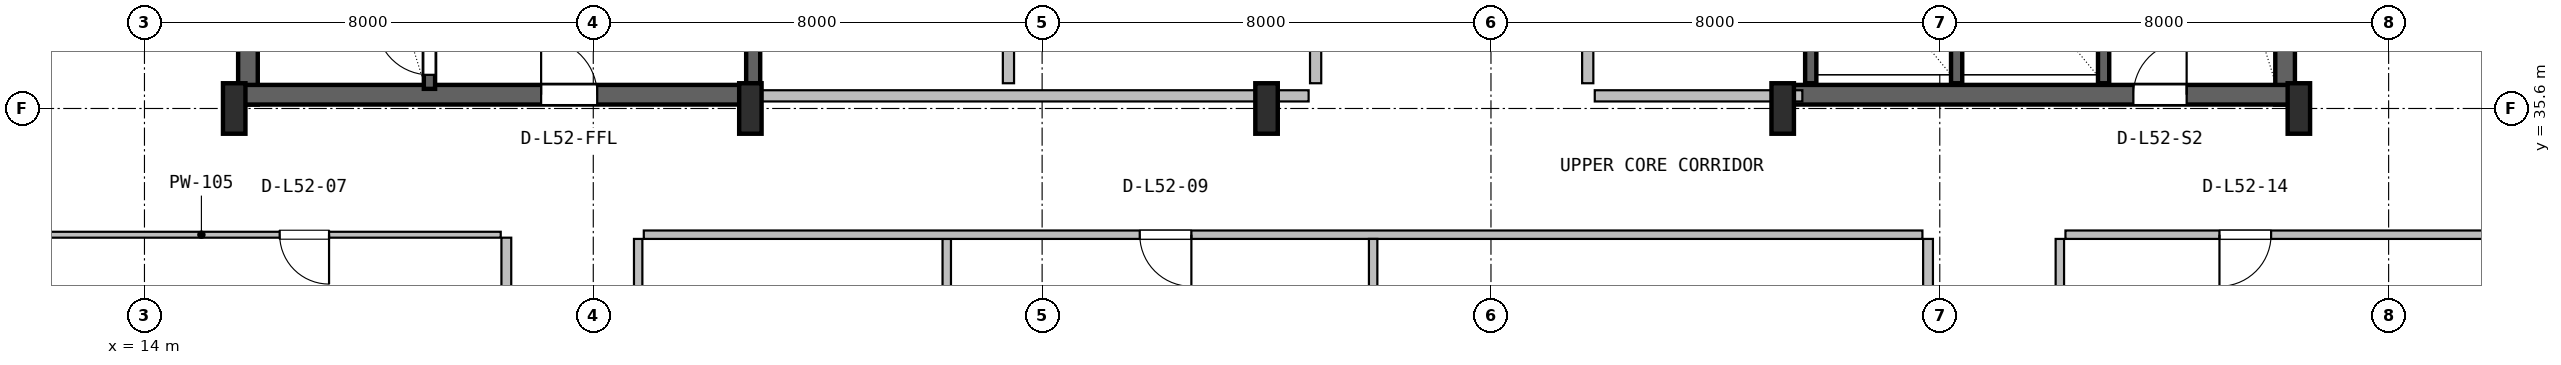
"""IFC4 building model, lengths in metres.
Left out: names, types, materials, properties, quantities, classifications, styles, units other than length and angle.
Written with IfcOpenShell. Run it as: python <this file> out.ifc"""

import sys

from ifc_helpers import new_model, si_unit, direction, frame, frame_2d, origin, origin_2d, place, context, subcontext, project, spatial, rectangle, i_section, extrude, source, transform, mapped, element, fill, save


model = new_model("IFC4")
c1 = context("Model", 3, precision=1e-05, world=origin(), true_north=direction((0.0, 1.0)))
c2 = subcontext(c1, "Body", "Model", "MODEL_VIEW")
j1 = project(units=[si_unit("LENGTHUNIT", "METRE"), si_unit("PLANEANGLEUNIT", "RADIAN")], contexts=[c1])
p1 = place(None, origin())
s1 = spatial("IfcSite", under=j1, at=p1, CompositionType="ELEMENT")
p2 = place(p1, origin())
s2 = spatial("IfcBuilding", under=s1, at=p2, CompositionType="ELEMENT")
p3 = place(p2, frame((0.0, 0.0, 211.2)))
s3 = spatial("IfcBuildingStorey", under=s2, at=p3, CompositionType="ELEMENT", Elevation=211.2)
for number, where, z_axis, x_axis in (
    (1, (15.845, 35.67, 0.0), (0.0, 0.0, 1.0), (0.0, 1.0, 0.0)),
    (2, (52.155, 35.67, 0.0), (0.0, 0.0, 1.0), (0.0, 1.0, 0.0)),
):
    element("IfcWall", number, at=place(p3, frame(where, z_axis=z_axis, x_axis=x_axis)), inside=s3, PredefinedType="SHEAR", context=c2, shape_type="SweptSolid", body=[
        extrude(rectangle(XDim=11.13, YDim=0.35, at=frame_2d((5.565, 0.0))), origin(), (0.0, 0.0, 1.0), 3.55),
    ])
p4 = place(p3, frame((15.67, 35.845, 0.0), z_axis=(0.0, 0.0, 1.0), x_axis=(1.0, 0.0, 0.0)))
e3 = element("IfcWall", 3, at=p4, inside=s3, PredefinedType="SHEAR", context=c2, shape_type="SweptSolid", body=[
    extrude(rectangle(XDim=9.13, YDim=0.35, at=frame_2d((4.565, 0.0))), origin(), (0.0, 0.0, 1.0), 3.55),
])
p5 = place(p4, frame((5.4, 0.0, 0.0)))
e4 = element("IfcOpeningElement", 4, at=p5, cuts=e3, PredefinedType="OPENING", context=c2, shape_type="SweptSolid", body=[
    extrude(rectangle(XDim=1.0, YDim=2.1, at=frame_2d((0.5, 1.05))), frame((0.0, 0.185, 0.0), z_axis=(0.0, -1.0, 0.0), x_axis=(1.0, 0.0, 0.0)), (0.0, 0.0, 1.0), 0.37),
])
p6 = place(p3, frame((43.2, 35.845, 0.0), z_axis=(0.0, 0.0, 1.0), x_axis=(1.0, 0.0, 0.0)))
e5 = element("IfcWall", 5, at=p6, inside=s3, PredefinedType="SHEAR", context=c2, shape_type="SweptSolid", body=[
    extrude(rectangle(XDim=9.13, YDim=0.35, at=frame_2d((4.565, 0.0))), origin(), (0.0, 0.0, 1.0), 3.55),
])
p7 = place(p6, frame((6.25, 0.0, 0.0)))
e6 = element("IfcOpeningElement", 6, at=p7, cuts=e5, PredefinedType="OPENING", context=c2, shape_type="SweptSolid", body=[
    extrude(rectangle(XDim=0.95, YDim=2.1, at=frame_2d((0.475, 1.05))), frame((0.0, 0.185, 0.0), z_axis=(0.0, -1.0, 0.0), x_axis=(1.0, 0.0, 0.0)), (0.0, 0.0, 1.0), 0.37),
])
m1 = source(origin(), c2, "Body", "SweptSolid", [
    extrude(i_section(OverallWidth=0.4, OverallDepth=0.9, WebThickness=0.016, FlangeThickness=0.028, FilletRadius=0.016, at=origin_2d()), origin(), (0.0, 0.0, 1.0), 3.8),
])
for number, where, z_axis, x_axis in (
    (7, (15.6, 35.6, 0.0), (0.0, 0.0, 1.0), (1.0, 0.0, 0.0)),
    (8, (24.8, 35.6, 0.0), (0.0, 0.0, 1.0), (1.0, 0.0, 0.0)),
    (9, (34.0, 35.6, 0.0), (0.0, 0.0, 1.0), (1.0, 0.0, 0.0)),
    (10, (43.2, 35.6, 0.0), (0.0, 0.0, 1.0), (1.0, 0.0, 0.0)),
    (11, (52.4, 35.6, 0.0), (0.0, 0.0, 1.0), (1.0, 0.0, 0.0)),
):
    element("IfcColumn", number, at=place(p3, frame(where, z_axis=z_axis, x_axis=x_axis)), inside=s3, PredefinedType="COLUMN", context=c2, shape_type="MappedRepresentation", body=[
        mapped(m1, transform((0.0, 0.0, 0.0), x_axis=(1.0, 0.0, 0.0), y_axis=(0.0, 1.0, 0.0), z_axis=(0.0, 0.0, 1.0), scale=1.0)),
    ])
p8 = place(p3, frame((19.08, 35.95, 0.0), z_axis=(0.0, 0.0, 1.0), x_axis=(0.0, 1.0, 0.0)))
e12 = element("IfcWall", 12, at=p8, inside=s3, PredefinedType="SHEAR", context=c2, shape_type="SweptSolid", body=[
    extrude(rectangle(XDim=9.65, YDim=0.2, at=frame_2d((4.825, 0.0))), origin(), (0.0, 0.0, 1.0), 3.55),
])
p9 = place(p8, frame((0.25, 0.0, 0.0)))
e13 = element("IfcOpeningElement", 13, at=p9, cuts=e12, PredefinedType="OPENING", context=c2, shape_type="SweptSolid", body=[
    extrude(rectangle(XDim=0.95, YDim=2.1, at=frame_2d((0.475, 1.05))), frame((0.0, 0.11, 0.0), z_axis=(0.0, -1.0, 0.0), x_axis=(1.0, 0.0, 0.0)), (0.0, 0.0, 1.0), 0.22),
])
p10 = place(p3, frame((24.85, 36.05, 0.0), z_axis=(0.0, 0.0, 1.0), x_axis=(0.0, 1.0, 0.0)))
e14 = element("IfcWall", 14, at=p10, inside=s3, PredefinedType="SHEAR", context=c2, shape_type="SweptSolid", body=[
    extrude(rectangle(XDim=10.45, YDim=0.25, at=frame_2d((5.225, 0.0))), origin(), (0.0, 0.0, 1.0), 3.55),
])
p11 = place(p3, frame((48.92, 36.05, 0.0), z_axis=(0.0, 0.0, 1.0), x_axis=(0.0, 1.0, 0.0)))
e15 = element("IfcWall", 15, at=p11, inside=s3, PredefinedType="SHEAR", context=c2, shape_type="SweptSolid", body=[
    extrude(rectangle(XDim=10.5, YDim=0.2, at=frame_2d((5.25, 0.0))), origin(), (0.0, 0.0, 1.0), 3.55),
])
for number, where, z_axis, x_axis in (
    (16, (43.7, 36.05, 0.0), (0.0, 0.0, 1.0), (0.0, 1.0, 0.0)),
    (17, (46.3, 36.05, 0.0), (0.0, 0.0, 1.0), (0.0, 1.0, 0.0)),
):
    element("IfcWall", number, at=place(p3, frame(where, z_axis=z_axis, x_axis=x_axis)), inside=s3, PredefinedType="SHEAR", context=c2, shape_type="SweptSolid", body=[
        extrude(rectangle(XDim=3.05, YDim=0.2, at=frame_2d((1.525, 0.0))), origin(), (0.0, 0.0, 1.0), 3.55),
    ])
p12 = place(p3, frame((25.0, 35.825, 0.0), z_axis=(0.0, 0.0, 1.0), x_axis=(1.0, 0.0, 0.0)))
e18 = element("IfcWall", 18, at=p12, inside=s3, PredefinedType="PLUMBINGWALL", context=c2, shape_type="SweptSolid", body=[
    extrude(rectangle(XDim=9.75, YDim=0.2, at=frame_2d((4.875, 0.0))), origin(), (0.0, 0.0, 1.0), 2.575),
])
for number, where, z_axis, x_axis in (
    (19, (29.4, 36.05, 0.0), (0.0, 0.0, 1.0), (0.0, 1.0, 0.0)),
    (20, (34.875, 36.05, 0.0), (0.0, 0.0, 1.0), (0.0, 1.0, 0.0)),
):
    element("IfcWall", number, at=place(p3, frame(where, z_axis=z_axis, x_axis=x_axis)), inside=s3, PredefinedType="PLUMBINGWALL", context=c2, shape_type="SweptSolid", body=[
        extrude(rectangle(XDim=3.1, YDim=0.2, at=frame_2d((1.55, 0.0))), origin(), (0.0, 0.0, 1.0), 3.53),
    ])
p13 = place(p3, frame((39.85, 35.825, 0.0), z_axis=(0.0, 0.0, 1.0), x_axis=(1.0, 0.0, 0.0)))
e21 = element("IfcWall", 21, at=p13, inside=s3, PredefinedType="SOLIDWALL", context=c2, shape_type="SweptSolid", body=[
    extrude(rectangle(XDim=3.7, YDim=0.2, at=frame_2d((1.85, 0.0))), origin(), (0.0, 0.0, 1.0), 2.575),
])
p14 = place(p3, frame((39.725, 36.05, 0.0), z_axis=(0.0, 0.0, 1.0), x_axis=(0.0, 1.0, 0.0)))
e22 = element("IfcWall", 22, at=p14, inside=s3, PredefinedType="SOLIDWALL", context=c2, shape_type="SweptSolid", body=[
    extrude(rectangle(XDim=3.1, YDim=0.2, at=frame_2d((1.55, 0.0))), origin(), (0.0, 0.0, 1.0), 3.53),
])
p15 = place(p3, frame((20.45, 10.38, 0.0), z_axis=(0.0, 0.0, 1.0), x_axis=(0.0, 1.0, 0.0)))
e23 = element("IfcWall", 23, at=p15, inside=s3, PredefinedType="PARTITIONING", context=c2, shape_type="SweptSolid", body=[
    extrude(rectangle(XDim=22.917, YDim=0.175, at=frame_2d((11.458, 0.0))), origin(), (0.0, 0.0, 1.0), 3.171),
])
p16 = place(p15, frame((2.935, 0.0, 0.0)))
e24 = element("IfcOpeningElement", 24, at=p16, cuts=e23, PredefinedType="OPENING", context=c2, shape_type="SweptSolid", body=[
    extrude(rectangle(XDim=1.05, YDim=2.1, at=frame_2d((0.525, 1.05))), frame((0.0, 0.098, 0.0), z_axis=(0.0, -1.0, 0.0), x_axis=(1.0, 0.0, 0.0)), (0.0, 0.0, 1.0), 0.195),
])
p17 = place(p15, frame((9.29, 0.0, 0.0)))
e25 = element("IfcOpeningElement", 25, at=p17, cuts=e23, PredefinedType="OPENING", context=c2, shape_type="SweptSolid", body=[
    extrude(rectangle(XDim=0.88, YDim=2.06, at=frame_2d((0.44, 1.03))), frame((0.0, 0.098, 0.0), z_axis=(0.0, -1.0, 0.0), x_axis=(1.0, 0.0, 0.0)), (0.0, 0.0, 1.0), 0.195),
])
p18 = place(p15, frame((14.815, 0.0, 0.0)))
e26 = element("IfcOpeningElement", 26, at=p18, cuts=e23, PredefinedType="OPENING", context=c2, shape_type="SweptSolid", body=[
    extrude(rectangle(XDim=1.0, YDim=2.1, at=frame_2d((0.5, 1.05))), frame((0.0, 0.098, 0.0), z_axis=(0.0, -1.0, 0.0), x_axis=(1.0, 0.0, 0.0)), (0.0, 0.0, 1.0), 0.195),
])
p19 = place(p3, frame((9.68, 33.35, 0.0), z_axis=(0.0, 0.0, 1.0), x_axis=(1.0, 0.0, 0.0)))
e27 = element("IfcWall", 27, at=p19, inside=s3, PredefinedType="PARTITIONING", context=c2, shape_type="SweptSolid", body=[
    extrude(rectangle(XDim=10.67, YDim=0.105, at=frame_2d((5.335, 0.0))), origin(), (0.0, 0.0, 1.0), 3.171),
])
p20 = place(p19, frame((6.73, 0.0, 0.0)))
e28 = element("IfcOpeningElement", 28, at=p20, cuts=e27, PredefinedType="OPENING", context=c2, shape_type="SweptSolid", body=[
    extrude(rectangle(XDim=0.88, YDim=2.06, at=frame_2d((0.44, 1.03))), frame((0.0, 0.062, 0.0), z_axis=(0.0, -1.0, 0.0), x_axis=(1.0, 0.0, 0.0)), (0.0, 0.0, 1.0), 0.125),
])
p21 = place(p3, frame((28.3, 10.38, 0.0), z_axis=(0.0, 0.0, 1.0), x_axis=(0.0, 1.0, 0.0)))
e29 = element("IfcWall", 29, at=p21, inside=s3, PredefinedType="PARTITIONING", context=c2, shape_type="SweptSolid", body=[
    extrude(rectangle(XDim=22.895, YDim=0.15, at=frame_2d((11.448, 0.0))), origin(), (0.0, 0.0, 1.0), 2.908),
])
p22 = place(p3, frame((22.9, 33.35, 0.0), z_axis=(0.0, 0.0, 1.0), x_axis=(1.0, 0.0, 0.0)))
e30 = element("IfcWall", 30, at=p22, inside=s3, PredefinedType="PARTITIONING", context=c2, shape_type="SweptSolid", body=[
    extrude(rectangle(XDim=22.79, YDim=0.15, at=frame_2d((11.395, 0.0))), origin(), (0.0, 0.0, 1.0), 2.908),
])
p23 = place(p22, frame((8.84, 0.0, 0.0)))
e31 = element("IfcOpeningElement", 31, at=p23, cuts=e30, PredefinedType="OPENING", context=c2, shape_type="SweptSolid", body=[
    extrude(rectangle(XDim=0.92, YDim=2.08, at=frame_2d((0.46, 1.04))), frame((0.0, 0.085, 0.0), z_axis=(0.0, -1.0, 0.0), x_axis=(1.0, 0.0, 0.0)), (0.0, 0.0, 1.0), 0.17),
])
p24 = place(p3, frame((22.8, 10.38, 0.0), z_axis=(0.0, 0.0, 1.0), x_axis=(0.0, 1.0, 0.0)))
e32 = element("IfcWall", 32, at=p24, inside=s3, PredefinedType="PARTITIONING", context=c2, shape_type="SweptSolid", body=[
    extrude(rectangle(XDim=22.895, YDim=0.15, at=frame_2d((11.448, 0.0))), origin(), (0.0, 0.0, 1.0), 3.171),
])
p25 = place(p24, frame((11.43, 0.0, 0.0)))
e33 = element("IfcOpeningElement", 33, at=p25, cuts=e32, PredefinedType="OPENING", context=c2, shape_type="SweptSolid", body=[
    extrude(rectangle(XDim=0.92, YDim=2.08, at=frame_2d((0.46, 1.04))), frame((0.0, 0.085, 0.0), z_axis=(0.0, -1.0, 0.0), x_axis=(1.0, 0.0, 0.0)), (0.0, 0.0, 1.0), 0.17),
])
p26 = place(p3, frame((35.9, 10.38, 0.0), z_axis=(0.0, 0.0, 1.0), x_axis=(0.0, 1.0, 0.0)))
e34 = element("IfcWall", 34, at=p26, inside=s3, PredefinedType="PARTITIONING", context=c2, shape_type="SweptSolid", body=[
    extrude(rectangle(XDim=22.895, YDim=0.15, at=frame_2d((11.448, 0.0))), origin(), (0.0, 0.0, 1.0), 2.908),
])
p27 = place(p3, frame((45.79, 10.38, 0.0), z_axis=(0.0, 0.0, 1.0), x_axis=(0.0, 1.0, 0.0)))
e35 = element("IfcWall", 35, at=p27, inside=s3, PredefinedType="PARTITIONING", context=c2, shape_type="SweptSolid", body=[
    extrude(rectangle(XDim=22.895, YDim=0.175, at=frame_2d((11.448, 0.0))), origin(), (0.0, 0.0, 1.0), 2.908),
])
p28 = place(p27, frame((11.365, 0.0, 0.0)))
e36 = element("IfcOpeningElement", 36, at=p28, cuts=e35, PredefinedType="OPENING", context=c2, shape_type="SweptSolid", body=[
    extrude(rectangle(XDim=1.05, YDim=2.1, at=frame_2d((0.525, 1.05))), frame((0.0, 0.098, 0.0), z_axis=(0.0, -1.0, 0.0), x_axis=(1.0, 0.0, 0.0)), (0.0, 0.0, 1.0), 0.195),
])
p29 = place(p3, frame((48.14, 10.38, 0.0), z_axis=(0.0, 0.0, 1.0), x_axis=(0.0, 1.0, 0.0)))
e37 = element("IfcWall", 37, at=p29, inside=s3, PredefinedType="PARTITIONING", context=c2, shape_type="SweptSolid", body=[
    extrude(rectangle(XDim=22.895, YDim=0.15, at=frame_2d((11.448, 0.0))), origin(), (0.0, 0.0, 1.0), 3.171),
])
p30 = place(p29, frame((2.35, 0.0, 0.0)))
e38 = element("IfcOpeningElement", 38, at=p30, cuts=e37, PredefinedType="OPENING", context=c2, shape_type="SweptSolid", body=[
    extrude(rectangle(XDim=0.88, YDim=2.06, at=frame_2d((0.44, 1.03))), frame((0.0, 0.085, 0.0), z_axis=(0.0, -1.0, 0.0), x_axis=(1.0, 0.0, 0.0)), (0.0, 0.0, 1.0), 0.17),
])
p31 = place(p29, frame((7.285, 0.0, 0.0)))
e39 = element("IfcOpeningElement", 39, at=p31, cuts=e37, PredefinedType="OPENING", context=c2, shape_type="SweptSolid", body=[
    extrude(rectangle(XDim=1.0, YDim=2.1, at=frame_2d((0.5, 1.05))), frame((0.0, 0.085, 0.0), z_axis=(0.0, -1.0, 0.0), x_axis=(1.0, 0.0, 0.0)), (0.0, 0.0, 1.0), 0.17),
])
p32 = place(p29, frame((14.27, 0.0, 0.0)))
e40 = element("IfcOpeningElement", 40, at=p32, cuts=e37, PredefinedType="OPENING", context=c2, shape_type="SweptSolid", body=[
    extrude(rectangle(XDim=0.88, YDim=2.06, at=frame_2d((0.44, 1.03))), frame((0.0, 0.085, 0.0), z_axis=(0.0, -1.0, 0.0), x_axis=(1.0, 0.0, 0.0)), (0.0, 0.0, 1.0), 0.17),
])
p33 = place(p3, frame((48.24, 33.35, 0.0), z_axis=(0.0, 0.0, 1.0), x_axis=(1.0, 0.0, 0.0)))
e41 = element("IfcWall", 41, at=p33, inside=s3, PredefinedType="PARTITIONING", context=c2, shape_type="SweptSolid", body=[
    extrude(rectangle(XDim=10.08, YDim=0.15, at=frame_2d((5.04, 0.0))), origin(), (0.0, 0.0, 1.0), 3.171),
])
p34 = place(p33, frame((2.745, 0.0, 0.0)))
e42 = element("IfcOpeningElement", 42, at=p34, cuts=e41, PredefinedType="OPENING", context=c2, shape_type="SweptSolid", body=[
    extrude(rectangle(XDim=0.92, YDim=2.08, at=frame_2d((0.46, 1.04))), frame((0.0, 0.085, 0.0), z_axis=(0.0, -1.0, 0.0), x_axis=(1.0, 0.0, 0.0)), (0.0, 0.0, 1.0), 0.17),
])
m2 = source(origin(), c2, "Body", "SweptSolid", [
    extrude(rectangle(XDim=0.95, YDim=2.1, at=frame_2d((0.475, 1.05))), frame((0.0, 0.025, 0.0), z_axis=(0.0, -1.0, 0.0), x_axis=(1.0, 0.0, 0.0)), (0.0, 0.0, 1.0), 0.05),
])
p35 = place(p9, origin())
e43 = element("IfcDoor", 43, at=p35, inside=s3, OperationType="SINGLE_SWING_RIGHT", PredefinedType="DOOR", context=c2, shape_type="MappedRepresentation", body=[
    mapped(m2, transform((0.0, 0.0, 0.0), x_axis=(1.0, 0.0, 0.0), y_axis=(0.0, 1.0, 0.0), z_axis=(0.0, 0.0, 1.0), scale=1.0)),
])
fill(e13, e43)
m3 = source(origin(), c2, "Body", "SweptSolid", [
    extrude(rectangle(XDim=1.0, YDim=2.1, at=frame_2d((0.5, 1.05))), frame((0.0, 0.025, 0.0), z_axis=(0.0, -1.0, 0.0), x_axis=(1.0, 0.0, 0.0)), (0.0, 0.0, 1.0), 0.05),
])
p36 = place(p5, origin())
e44 = element("IfcDoor", 44, at=p36, inside=s3, OperationType="SINGLE_SWING_LEFT", PredefinedType="DOOR", context=c2, shape_type="MappedRepresentation", body=[
    mapped(m3, transform((0.0, 0.0, 0.0), x_axis=(1.0, 0.0, 0.0), y_axis=(0.0, 1.0, 0.0), z_axis=(0.0, 0.0, 1.0), scale=1.0)),
])
fill(e4, e44)
p37 = place(p7, origin())
e45 = element("IfcDoor", 45, at=p37, inside=s3, OperationType="SINGLE_SWING_RIGHT", PredefinedType="DOOR", context=c2, shape_type="MappedRepresentation", body=[
    mapped(m2, transform((0.0, 0.0, 0.0), x_axis=(1.0, 0.0, 0.0), y_axis=(0.0, 1.0, 0.0), z_axis=(0.0, 0.0, 1.0), scale=1.0)),
])
fill(e6, e45)
m4 = source(origin(), c2, "Body", "SweptSolid", [
    extrude(rectangle(XDim=0.88, YDim=2.06, at=frame_2d((0.44, 1.03))), frame((0.0, 0.025, 0.0), z_axis=(0.0, -1.0, 0.0), x_axis=(1.0, 0.0, 0.0)), (0.0, 0.0, 1.0), 0.05),
])
p38 = place(p20, frame((0.88, 0.0, 0.0), z_axis=(0.0, 0.0, 1.0), x_axis=(-1.0, 0.0, 0.0)))
e46 = element("IfcDoor", 46, at=p38, inside=s3, OperationType="SINGLE_SWING_RIGHT", PredefinedType="DOOR", context=c2, shape_type="MappedRepresentation", body=[
    mapped(m4, transform((0.0, 0.0, 0.0), x_axis=(1.0, 0.0, 0.0), y_axis=(0.0, 1.0, 0.0), z_axis=(0.0, 0.0, 1.0), scale=1.0)),
])
fill(e28, e46)
m5 = source(origin(), c2, "Body", "SweptSolid", [
    extrude(rectangle(XDim=0.92, YDim=2.08, at=frame_2d((0.46, 1.04))), frame((0.0, 0.025, 0.0), z_axis=(0.0, -1.0, 0.0), x_axis=(1.0, 0.0, 0.0)), (0.0, 0.0, 1.0), 0.05),
])
p39 = place(p23, frame((0.92, 0.0, 0.0), z_axis=(0.0, 0.0, 1.0), x_axis=(-1.0, 0.0, 0.0)))
e47 = element("IfcDoor", 47, at=p39, inside=s3, OperationType="SINGLE_SWING_RIGHT", PredefinedType="DOOR", context=c2, shape_type="MappedRepresentation", body=[
    mapped(m5, transform((0.0, 0.0, 0.0), x_axis=(1.0, 0.0, 0.0), y_axis=(0.0, 1.0, 0.0), z_axis=(0.0, 0.0, 1.0), scale=1.0)),
])
fill(e31, e47)
p40 = place(p34, frame((0.92, 0.0, 0.0), z_axis=(0.0, 0.0, 1.0), x_axis=(-1.0, 0.0, 0.0)))
e48 = element("IfcDoor", 48, at=p40, inside=s3, OperationType="SINGLE_SWING_LEFT", PredefinedType="DOOR", context=c2, shape_type="MappedRepresentation", body=[
    mapped(m5, transform((0.0, 0.0, 0.0), x_axis=(1.0, 0.0, 0.0), y_axis=(0.0, 1.0, 0.0), z_axis=(0.0, 0.0, 1.0), scale=1.0)),
])
fill(e42, e48)
save(model, sys.argv[1])
